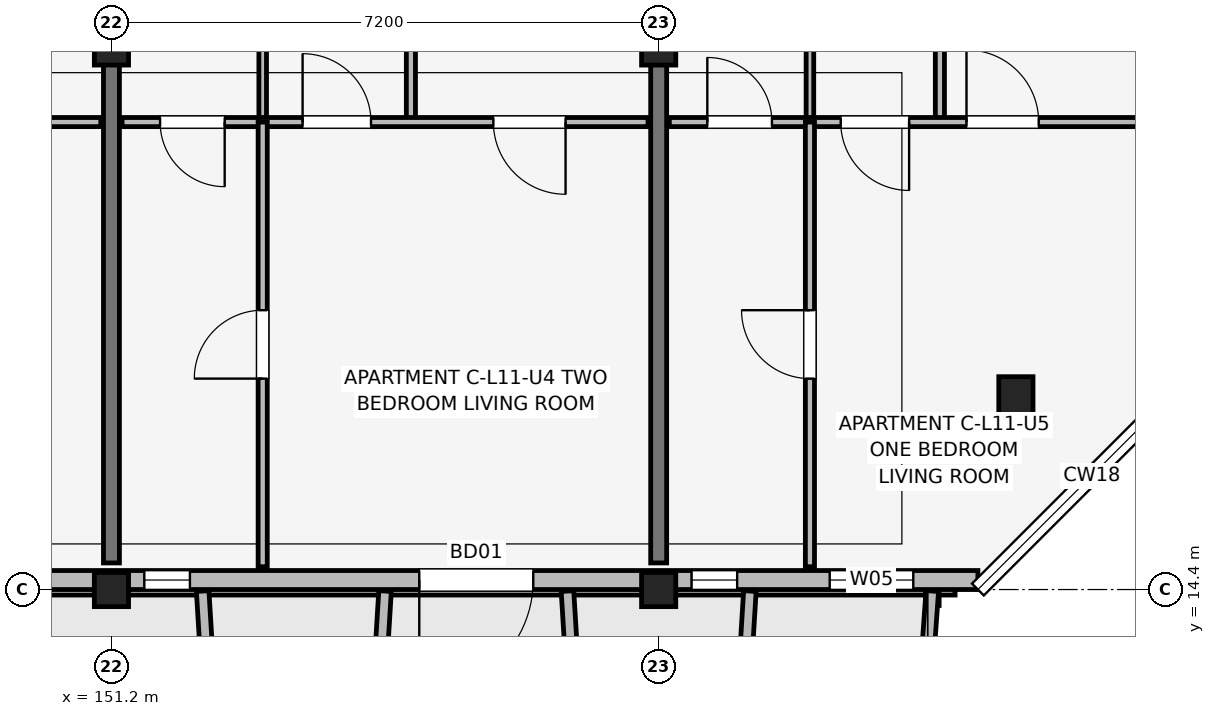
"""IFC4 building model, lengths in metres.
Left out: names, types, materials, properties, quantities, classifications, styles, units other than length and angle.
Written with IfcOpenShell. Run it as: python <this file> out.ifc"""

import sys

from ifc_helpers import new_model, si_unit, direction, frame, frame_2d, origin, origin_2d, place, context, subcontext, project, spatial, rectangle, extrude, element, fill, save


model = new_model("IFC4")
c1 = context("Model", 3, precision=1e-05, world=origin(), true_north=direction((0.0, 1.0)))
c2 = subcontext(c1, "Body", "Model", "MODEL_VIEW")
j1 = project(units=[si_unit("LENGTHUNIT", "METRE"), si_unit("PLANEANGLEUNIT", "RADIAN")], contexts=[c1])
p1 = place(None, origin())
s1 = spatial("IfcSite", under=j1, at=p1, CompositionType="ELEMENT")
p2 = place(p1, origin())
s2 = spatial("IfcBuilding", under=s1, at=p2, CompositionType="ELEMENT")
p3 = place(p2, frame((0.0, 0.0, 37.05)))
s3 = spatial("IfcBuildingStorey", under=s2, at=p3, CompositionType="ELEMENT", Elevation=37.05)
p4 = place(p3, frame((151.2, 14.4, 0.0), z_axis=(0.0, 0.0, 1.0), x_axis=(1.0, 0.0, 0.0)))
e1 = element("IfcColumn", 1, at=p4, inside=s3, PredefinedType="COLUMN", context=c2, shape_type="SweptSolid", body=[
    extrude(rectangle(XDim=0.45, YDim=0.45, at=origin_2d()), origin(), (0.0, 0.0, 1.0), 3.15),
])
p5 = place(p3, frame((151.2, 21.6, 0.0), z_axis=(0.0, 0.0, 1.0), x_axis=(1.0, 0.0, 0.0)))
e2 = element("IfcColumn", 2, at=p5, inside=s3, PredefinedType="COLUMN", context=c2, shape_type="SweptSolid", body=[
    extrude(rectangle(XDim=0.45, YDim=0.6, at=origin_2d()), origin(), (0.0, 0.0, 1.0), 3.15),
])
p6 = place(p3, frame((158.4, 14.4, 0.0), z_axis=(0.0, 0.0, 1.0), x_axis=(1.0, 0.0, 0.0)))
e3 = element("IfcColumn", 3, at=p6, inside=s3, PredefinedType="COLUMN", context=c2, shape_type="SweptSolid", body=[
    extrude(rectangle(XDim=0.45, YDim=0.45, at=origin_2d()), origin(), (0.0, 0.0, 1.0), 3.15),
])
for number, where, z_axis, x_axis in (
    (4, (158.4, 21.6, 0.0), (0.0, 0.0, 1.0), (1.0, 0.0, 0.0)),
    (5, (163.1, 16.9, 0.0), (0.0, 0.0, 1.0), (1.0, 0.0, 0.0)),
):
    element("IfcColumn", number, at=place(p3, frame(where, z_axis=z_axis, x_axis=x_axis)), inside=s3, PredefinedType="COLUMN", context=c2, shape_type="SweptSolid", body=[
        extrude(rectangle(XDim=0.45, YDim=0.6, at=origin_2d()), origin(), (0.0, 0.0, 1.0), 3.15),
    ])
for number, where, z_axis, x_axis in (
    (6, (151.2, 14.75, 0.0), (0.0, 0.0, 1.0), (0.0, 1.0, 0.0)),
    (7, (158.4, 14.75, 0.0), (0.0, 0.0, 1.0), (0.0, 1.0, 0.0)),
):
    element("IfcWall", number, at=place(p3, frame(where, z_axis=z_axis, x_axis=x_axis)), inside=s3, PredefinedType="SHEAR", context=c2, shape_type="SweptSolid", body=[
        extrude(rectangle(XDim=9.4, YDim=0.21, at=frame_2d((4.7, 0.0))), origin(), (0.0, 0.0, 1.0), 3.15),
    ])
p7 = place(p3, frame((132.6, 14.525, 0.0), z_axis=(0.0, 0.0, 1.0), x_axis=(1.0, 0.0, 0.0)))
e8 = element("IfcWall", 8, at=p7, inside=s3, PredefinedType="SOLIDWALL", context=c2, shape_type="SweptSolid", body=[
    extrude(rectangle(XDim=30.0, YDim=0.25, at=frame_2d((15.0, 0.0))), origin(), (0.0, 0.0, 1.0), 2.45),
])
p8 = place(p7, frame((9.825, 0.0, 0.0), z_axis=(0.0, 0.0, 1.0), x_axis=(-1.0, 0.0, 0.0)))
e9 = element("IfcOpeningElement", 9, at=p8, cuts=e8, PredefinedType="OPENING", context=c2, shape_type="SweptSolid", body=[
    extrude(rectangle(XDim=1.65, YDim=2.15, at=frame_2d((0.825, 1.075))), frame((0.0, 0.135, 0.0), z_axis=(0.0, -1.0, 0.0), x_axis=(1.0, 0.0, 0.0)), (0.0, 0.0, 1.0), 0.27),
])
p9 = place(p7, frame((24.15, 0.0, 0.0), z_axis=(0.0, 0.0, 1.0), x_axis=(-1.0, 0.0, 0.0)))
e10 = element("IfcOpeningElement", 10, at=p9, cuts=e8, PredefinedType="OPENING", context=c2, shape_type="SweptSolid", body=[
    extrude(rectangle(XDim=1.5, YDim=2.15, at=frame_2d((0.75, 1.075))), frame((0.0, 0.135, 0.0), z_axis=(0.0, -1.0, 0.0), x_axis=(1.0, 0.0, 0.0)), (0.0, 0.0, 1.0), 0.27),
])
p10 = place(p7, frame((0.77, 0.0, 0.7)))
e11 = element("IfcOpeningElement", 11, at=p10, cuts=e8, PredefinedType="OPENING", context=c2, shape_type="SweptSolid", body=[
    extrude(rectangle(XDim=1.46, YDim=1.55, at=frame_2d((0.73, 0.775))), frame((0.0, 0.135, 0.0), z_axis=(0.0, -1.0, 0.0), x_axis=(1.0, 0.0, 0.0)), (0.0, 0.0, 1.0), 0.27),
])
p11 = place(p7, frame((3.167, 0.0, 0.75)))
e12 = element("IfcOpeningElement", 12, at=p11, cuts=e8, PredefinedType="OPENING", context=c2, shape_type="SweptSolid", body=[
    extrude(rectangle(XDim=0.6, YDim=1.25, at=frame_2d((0.3, 0.625))), frame((0.0, 0.135, 0.0), z_axis=(0.0, -1.0, 0.0), x_axis=(1.0, 0.0, 0.0)), (0.0, 0.0, 1.0), 0.27),
])
p12 = place(p7, frame((4.633, 0.0, 0.75)))
e13 = element("IfcOpeningElement", 13, at=p12, cuts=e8, PredefinedType="OPENING", context=c2, shape_type="SweptSolid", body=[
    extrude(rectangle(XDim=0.6, YDim=1.25, at=frame_2d((0.3, 0.625))), frame((0.0, 0.135, 0.0), z_axis=(0.0, -1.0, 0.0), x_axis=(1.0, 0.0, 0.0)), (0.0, 0.0, 1.0), 0.27),
])
p13 = place(p7, frame((12.87, 0.0, 0.7)))
e14 = element("IfcOpeningElement", 14, at=p13, cuts=e8, PredefinedType="OPENING", context=c2, shape_type="SweptSolid", body=[
    extrude(rectangle(XDim=1.86, YDim=1.6, at=frame_2d((0.93, 0.8))), frame((0.0, 0.135, 0.0), z_axis=(0.0, -1.0, 0.0), x_axis=(1.0, 0.0, 0.0)), (0.0, 0.0, 1.0), 0.27),
])
p14 = place(p7, frame((16.165, 0.0, 0.75)))
e15 = element("IfcOpeningElement", 15, at=p14, cuts=e8, PredefinedType="OPENING", context=c2, shape_type="SweptSolid", body=[
    extrude(rectangle(XDim=0.72, YDim=1.35, at=frame_2d((0.36, 0.675))), frame((0.0, 0.135, 0.0), z_axis=(0.0, -1.0, 0.0), x_axis=(1.0, 0.0, 0.0)), (0.0, 0.0, 1.0), 0.27),
])
p15 = place(p7, frame((19.032, 0.0, 0.75)))
e16 = element("IfcOpeningElement", 16, at=p15, cuts=e8, PredefinedType="OPENING", context=c2, shape_type="SweptSolid", body=[
    extrude(rectangle(XDim=0.6, YDim=1.25, at=frame_2d((0.3, 0.625))), frame((0.0, 0.135, 0.0), z_axis=(0.0, -1.0, 0.0), x_axis=(1.0, 0.0, 0.0)), (0.0, 0.0, 1.0), 0.27),
])
p16 = place(p7, frame((26.232, 0.0, 0.75)))
e17 = element("IfcOpeningElement", 17, at=p16, cuts=e8, PredefinedType="OPENING", context=c2, shape_type="SweptSolid", body=[
    extrude(rectangle(XDim=0.6, YDim=1.25, at=frame_2d((0.3, 0.625))), frame((0.0, 0.135, 0.0), z_axis=(0.0, -1.0, 0.0), x_axis=(1.0, 0.0, 0.0)), (0.0, 0.0, 1.0), 0.27),
])
p17 = place(p7, frame((28.05, 0.0, 0.75)))
e18 = element("IfcOpeningElement", 18, at=p17, cuts=e8, PredefinedType="OPENING", context=c2, shape_type="SweptSolid", body=[
    extrude(rectangle(XDim=1.1, YDim=1.5, at=frame_2d((0.55, 0.75))), frame((0.0, 0.135, 0.0), z_axis=(0.0, -1.0, 0.0), x_axis=(1.0, 0.0, 0.0)), (0.0, 0.0, 1.0), 0.27),
])
for number, where, z_axis, x_axis in (
    (19, (152.4, 14.38, 0.0), (0.0, 0.0, 1.0), (0.061, -0.998, 0.0)),
    (20, (154.8, 14.38, 0.0), (0.0, 0.0, 1.0), (-0.061, -0.998, 0.0)),
    (21, (157.2, 14.38, 0.0), (0.0, 0.0, 1.0), (0.061, -0.998, 0.0)),
):
    element("IfcWall", number, at=place(p3, frame(where, z_axis=z_axis, x_axis=x_axis)), inside=s3, PredefinedType="ELEMENTEDWALL", context=c2, shape_type="SweptSolid", body=[
        extrude(rectangle(XDim=1.964, YDim=0.165, at=frame_2d((0.982, 0.0))), origin(), (0.0, 0.0, 1.0), 2.53),
    ])
p18 = place(p3, frame((159.6, 14.38, 0.0), z_axis=(0.0, 0.0, 1.0), x_axis=(-0.061170732449, -0.998127317276, 0.0)))
e22 = element("IfcWall", 22, at=p18, inside=s3, PredefinedType="ELEMENTEDWALL", context=c2, shape_type="SweptSolid", body=[
    extrude(rectangle(XDim=1.964, YDim=0.165, at=frame_2d((0.982, 0.0))), origin(), (0.0, 0.0, 1.0), 2.95),
])
p19 = place(p3, frame((162.0, 14.38, 0.0), z_axis=(0.0, 0.0, 1.0), x_axis=(-0.071194071069, -0.997462482625, 0.0)))
e23 = element("IfcWall", 23, at=p19, inside=s3, PredefinedType="ELEMENTEDWALL", context=c2, shape_type="SweptSolid", body=[
    extrude(rectangle(XDim=1.965, YDim=0.165, at=frame_2d((0.982, 0.0))), origin(), (0.0, 0.0, 1.0), 2.95),
])
p20 = place(p3, frame((144.14, 20.55, 0.0), z_axis=(0.0, 0.0, 1.0), x_axis=(1.0, 0.0, 0.0)))
e24 = element("IfcWall", 24, at=p20, inside=s3, PredefinedType="PARTITIONING", context=c2, shape_type="SweptSolid", body=[
    extrude(rectangle(XDim=6.92, YDim=0.12, at=frame_2d((3.46, 0.0))), origin(), (0.0, 0.0, 1.0), 2.38),
])
p21 = place(p20, frame((0.5, 0.0, 0.0)))
e25 = element("IfcOpeningElement", 25, at=p21, cuts=e24, PredefinedType="OPENING", context=c2, shape_type="SweptSolid", body=[
    extrude(rectangle(XDim=0.85, YDim=2.08, at=frame_2d((0.425, 1.04))), frame((0.0, 0.07, 0.0), z_axis=(0.0, -1.0, 0.0), x_axis=(1.0, 0.0, 0.0)), (0.0, 0.0, 1.0), 0.14),
])
p22 = place(p20, frame((3.425, 0.0, 0.0), z_axis=(0.0, 0.0, 1.0), x_axis=(-1.0, 0.0, 0.0)))
e26 = element("IfcOpeningElement", 26, at=p22, cuts=e24, PredefinedType="OPENING", context=c2, shape_type="SweptSolid", body=[
    extrude(rectangle(XDim=0.9, YDim=2.08, at=frame_2d((0.45, 1.04))), frame((0.0, 0.07, 0.0), z_axis=(0.0, -1.0, 0.0), x_axis=(1.0, 0.0, 0.0)), (0.0, 0.0, 1.0), 0.14),
])
p23 = place(p20, frame((5.035, 0.0, 0.0)))
e27 = element("IfcOpeningElement", 27, at=p23, cuts=e24, PredefinedType="OPENING", context=c2, shape_type="SweptSolid", body=[
    extrude(rectangle(XDim=0.95, YDim=2.08, at=frame_2d((0.475, 1.04))), frame((0.0, 0.07, 0.0), z_axis=(0.0, -1.0, 0.0), x_axis=(1.0, 0.0, 0.0)), (0.0, 0.0, 1.0), 0.14),
])
p24 = place(p3, frame((153.19, 20.55, 0.0), z_axis=(0.0, 0.0, 1.0), x_axis=(0.0, 1.0, 0.0)))
e28 = element("IfcWall", 28, at=p24, inside=s3, PredefinedType="PARTITIONING", context=c2, shape_type="SweptSolid", body=[
    extrude(rectangle(XDim=3.75, YDim=0.1, at=frame_2d((1.875, 0.0))), origin(), (0.0, 0.0, 1.0), 2.38),
])
p25 = place(p3, frame((155.14, 20.55, 0.0), z_axis=(0.0, 0.0, 1.0), x_axis=(0.0, 1.0, 0.0)))
e29 = element("IfcWall", 29, at=p25, inside=s3, PredefinedType="PARTITIONING", context=c2, shape_type="SweptSolid", body=[
    extrude(rectangle(XDim=3.75, YDim=0.12, at=frame_2d((1.875, 0.0))), origin(), (0.0, 0.0, 1.0), 2.38),
])
p26 = place(p3, frame((151.34, 20.55, 0.0), z_axis=(0.0, 0.0, 1.0), x_axis=(1.0, 0.0, 0.0)))
e30 = element("IfcWall", 30, at=p26, inside=s3, PredefinedType="PARTITIONING", context=c2, shape_type="SweptSolid", body=[
    extrude(rectangle(XDim=6.92, YDim=0.12, at=frame_2d((3.46, 0.0))), origin(), (0.0, 0.0, 1.0), 2.38),
])
p27 = place(p26, frame((1.35, 0.0, 0.0), z_axis=(0.0, 0.0, 1.0), x_axis=(-1.0, 0.0, 0.0)))
e31 = element("IfcOpeningElement", 31, at=p27, cuts=e30, PredefinedType="OPENING", context=c2, shape_type="SweptSolid", body=[
    extrude(rectangle(XDim=0.85, YDim=2.08, at=frame_2d((0.425, 1.04))), frame((0.0, 0.07, 0.0), z_axis=(0.0, -1.0, 0.0), x_axis=(1.0, 0.0, 0.0)), (0.0, 0.0, 1.0), 0.14),
])
p28 = place(p26, frame((2.375, 0.0, 0.0)))
e32 = element("IfcOpeningElement", 32, at=p28, cuts=e30, PredefinedType="OPENING", context=c2, shape_type="SweptSolid", body=[
    extrude(rectangle(XDim=0.9, YDim=2.08, at=frame_2d((0.45, 1.04))), frame((0.0, 0.07, 0.0), z_axis=(0.0, -1.0, 0.0), x_axis=(1.0, 0.0, 0.0)), (0.0, 0.0, 1.0), 0.14),
])
p29 = place(p26, frame((5.835, 0.0, 0.0), z_axis=(0.0, 0.0, 1.0), x_axis=(-1.0, 0.0, 0.0)))
e33 = element("IfcOpeningElement", 33, at=p29, cuts=e30, PredefinedType="OPENING", context=c2, shape_type="SweptSolid", body=[
    extrude(rectangle(XDim=0.95, YDim=2.08, at=frame_2d((0.475, 1.04))), frame((0.0, 0.07, 0.0), z_axis=(0.0, -1.0, 0.0), x_axis=(1.0, 0.0, 0.0)), (0.0, 0.0, 1.0), 0.14),
])
p30 = place(p3, frame((153.19, 14.7, 0.0), z_axis=(0.0, 0.0, 1.0), x_axis=(0.0, 1.0, 0.0)))
e34 = element("IfcWall", 34, at=p30, inside=s3, PredefinedType="PARTITIONING", context=c2, shape_type="SweptSolid", body=[
    extrude(rectangle(XDim=5.85, YDim=0.12, at=frame_2d((2.925, 0.0))), origin(), (0.0, 0.0, 1.0), 2.38),
])
p31 = place(p30, frame((2.475, 0.0, 0.0)))
e35 = element("IfcOpeningElement", 35, at=p31, cuts=e34, PredefinedType="OPENING", context=c2, shape_type="SweptSolid", body=[
    extrude(rectangle(XDim=0.9, YDim=2.08, at=frame_2d((0.45, 1.04))), frame((0.0, 0.07, 0.0), z_axis=(0.0, -1.0, 0.0), x_axis=(1.0, 0.0, 0.0)), (0.0, 0.0, 1.0), 0.14),
])
p32 = place(p3, frame((160.39, 20.55, 0.0), z_axis=(0.0, 0.0, 1.0), x_axis=(0.0, 1.0, 0.0)))
e36 = element("IfcWall", 36, at=p32, inside=s3, PredefinedType="PARTITIONING", context=c2, shape_type="SweptSolid", body=[
    extrude(rectangle(XDim=3.75, YDim=0.1, at=frame_2d((1.875, 0.0))), origin(), (0.0, 0.0, 1.0), 2.38),
])
p33 = place(p3, frame((162.1, 20.55, 0.0), z_axis=(0.0, 0.0, 1.0), x_axis=(0.0, 1.0, 0.0)))
e37 = element("IfcWall", 37, at=p33, inside=s3, PredefinedType="PARTITIONING", context=c2, shape_type="SweptSolid", body=[
    extrude(rectangle(XDim=3.75, YDim=0.12, at=frame_2d((1.875, 0.0))), origin(), (0.0, 0.0, 1.0), 2.38),
])
p34 = place(p3, frame((158.54, 20.55, 0.0), z_axis=(0.0, 0.0, 1.0), x_axis=(1.0, 0.0, 0.0)))
e38 = element("IfcWall", 38, at=p34, inside=s3, PredefinedType="PARTITIONING", context=c2, shape_type="SweptSolid", body=[
    extrude(rectangle(XDim=6.92, YDim=0.12, at=frame_2d((3.46, 0.0))), origin(), (0.0, 0.0, 1.0), 2.38),
])
p35 = place(p34, frame((0.5, 0.0, 0.0)))
e39 = element("IfcOpeningElement", 39, at=p35, cuts=e38, PredefinedType="OPENING", context=c2, shape_type="SweptSolid", body=[
    extrude(rectangle(XDim=0.85, YDim=2.08, at=frame_2d((0.425, 1.04))), frame((0.0, 0.07, 0.0), z_axis=(0.0, -1.0, 0.0), x_axis=(1.0, 0.0, 0.0)), (0.0, 0.0, 1.0), 0.14),
])
p36 = place(p34, frame((3.155, 0.0, 0.0), z_axis=(0.0, 0.0, 1.0), x_axis=(-1.0, 0.0, 0.0)))
e40 = element("IfcOpeningElement", 40, at=p36, cuts=e38, PredefinedType="OPENING", context=c2, shape_type="SweptSolid", body=[
    extrude(rectangle(XDim=0.9, YDim=2.08, at=frame_2d((0.45, 1.04))), frame((0.0, 0.07, 0.0), z_axis=(0.0, -1.0, 0.0), x_axis=(1.0, 0.0, 0.0)), (0.0, 0.0, 1.0), 0.14),
])
p37 = place(p34, frame((3.91, 0.0, 0.0)))
e41 = element("IfcOpeningElement", 41, at=p37, cuts=e38, PredefinedType="OPENING", context=c2, shape_type="SweptSolid", body=[
    extrude(rectangle(XDim=0.95, YDim=2.08, at=frame_2d((0.475, 1.04))), frame((0.0, 0.07, 0.0), z_axis=(0.0, -1.0, 0.0), x_axis=(1.0, 0.0, 0.0)), (0.0, 0.0, 1.0), 0.14),
])
p38 = place(p3, frame((160.39, 14.7, 0.0), z_axis=(0.0, 0.0, 1.0), x_axis=(0.0, 1.0, 0.0)))
e42 = element("IfcWall", 42, at=p38, inside=s3, PredefinedType="PARTITIONING", context=c2, shape_type="SweptSolid", body=[
    extrude(rectangle(XDim=5.85, YDim=0.12, at=frame_2d((2.925, 0.0))), origin(), (0.0, 0.0, 1.0), 2.38),
])
p39 = place(p38, frame((2.475, 0.0, 0.0)))
e43 = element("IfcOpeningElement", 43, at=p39, cuts=e42, PredefinedType="OPENING", context=c2, shape_type="SweptSolid", body=[
    extrude(rectangle(XDim=0.9, YDim=2.08, at=frame_2d((0.45, 1.04))), frame((0.0, 0.07, 0.0), z_axis=(0.0, -1.0, 0.0), x_axis=(1.0, 0.0, 0.0)), (0.0, 0.0, 1.0), 0.14),
])
p40 = place(p9, origin())
e44 = element("IfcDoor", 44, at=p40, inside=s3, OperationType="SINGLE_SWING_LEFT", PredefinedType="DOOR", context=c2, shape_type="SweptSolid", body=[
    extrude(rectangle(XDim=1.5, YDim=2.15, at=frame_2d((0.75, 1.075))), frame((0.0, 0.025, 0.0), z_axis=(0.0, -1.0, 0.0), x_axis=(1.0, 0.0, 0.0)), (0.0, 0.0, 1.0), 0.05),
])
fill(e10, e44)
p41 = place(p15, origin())
e45 = element("IfcWindow", 45, at=p41, inside=s3, PartitioningType="SINGLE_PANEL", PredefinedType="WINDOW", context=c2, shape_type="SweptSolid", body=[
    extrude(rectangle(XDim=0.6, YDim=1.25, at=frame_2d((0.3, 0.625))), frame((0.0, 0.03, 0.0), z_axis=(0.0, -1.0, 0.0), x_axis=(1.0, 0.0, 0.0)), (0.0, 0.0, 1.0), 0.06),
])
fill(e16, e45)
p42 = place(p16, origin())
e46 = element("IfcWindow", 46, at=p42, inside=s3, PartitioningType="SINGLE_PANEL", PredefinedType="WINDOW", context=c2, shape_type="SweptSolid", body=[
    extrude(rectangle(XDim=0.6, YDim=1.25, at=frame_2d((0.3, 0.625))), frame((0.0, 0.03, 0.0), z_axis=(0.0, -1.0, 0.0), x_axis=(1.0, 0.0, 0.0)), (0.0, 0.0, 1.0), 0.06),
])
fill(e17, e46)
p43 = place(p17, origin())
e47 = element("IfcWindow", 47, at=p43, inside=s3, PartitioningType="SINGLE_PANEL", PredefinedType="WINDOW", context=c2, shape_type="SweptSolid", body=[
    extrude(rectangle(XDim=1.1, YDim=1.5, at=frame_2d((0.55, 0.75))), frame((0.0, 0.03, 0.0), z_axis=(0.0, -1.0, 0.0), x_axis=(1.0, 0.0, 0.0)), (0.0, 0.0, 1.0), 0.06),
])
fill(e18, e47)
p44 = place(p27, origin())
e48 = element("IfcDoor", 48, at=p44, inside=s3, OperationType="SINGLE_SWING_RIGHT", PredefinedType="DOOR", context=c2, shape_type="SweptSolid", body=[
    extrude(rectangle(XDim=0.85, YDim=2.08, at=frame_2d((0.425, 1.04))), frame((0.0, 0.025, 0.0), z_axis=(0.0, -1.0, 0.0), x_axis=(1.0, 0.0, 0.0)), (0.0, 0.0, 1.0), 0.05),
])
fill(e31, e48)
p45 = place(p28, origin())
e49 = element("IfcDoor", 49, at=p45, inside=s3, OperationType="SINGLE_SWING_LEFT", PredefinedType="DOOR", context=c2, shape_type="SweptSolid", body=[
    extrude(rectangle(XDim=0.9, YDim=2.08, at=frame_2d((0.45, 1.04))), frame((0.0, 0.025, 0.0), z_axis=(0.0, -1.0, 0.0), x_axis=(1.0, 0.0, 0.0)), (0.0, 0.0, 1.0), 0.05),
])
fill(e32, e49)
p46 = place(p29, origin())
e50 = element("IfcDoor", 50, at=p46, inside=s3, OperationType="SINGLE_SWING_RIGHT", PredefinedType="DOOR", context=c2, shape_type="SweptSolid", body=[
    extrude(rectangle(XDim=0.95, YDim=2.08, at=frame_2d((0.475, 1.04))), frame((0.0, 0.025, 0.0), z_axis=(0.0, -1.0, 0.0), x_axis=(1.0, 0.0, 0.0)), (0.0, 0.0, 1.0), 0.05),
])
fill(e33, e50)
p47 = place(p31, origin())
e51 = element("IfcDoor", 51, at=p47, inside=s3, OperationType="SINGLE_SWING_LEFT", PredefinedType="DOOR", context=c2, shape_type="SweptSolid", body=[
    extrude(rectangle(XDim=0.9, YDim=2.08, at=frame_2d((0.45, 1.04))), frame((0.0, 0.025, 0.0), z_axis=(0.0, -1.0, 0.0), x_axis=(1.0, 0.0, 0.0)), (0.0, 0.0, 1.0), 0.05),
])
fill(e35, e51)
p48 = place(p35, origin())
e52 = element("IfcDoor", 52, at=p48, inside=s3, OperationType="SINGLE_SWING_LEFT", PredefinedType="DOOR", context=c2, shape_type="SweptSolid", body=[
    extrude(rectangle(XDim=0.85, YDim=2.08, at=frame_2d((0.425, 1.04))), frame((0.0, 0.025, 0.0), z_axis=(0.0, -1.0, 0.0), x_axis=(1.0, 0.0, 0.0)), (0.0, 0.0, 1.0), 0.05),
])
fill(e39, e52)
p49 = place(p36, origin())
e53 = element("IfcDoor", 53, at=p49, inside=s3, OperationType="SINGLE_SWING_RIGHT", PredefinedType="DOOR", context=c2, shape_type="SweptSolid", body=[
    extrude(rectangle(XDim=0.9, YDim=2.08, at=frame_2d((0.45, 1.04))), frame((0.0, 0.025, 0.0), z_axis=(0.0, -1.0, 0.0), x_axis=(1.0, 0.0, 0.0)), (0.0, 0.0, 1.0), 0.05),
])
fill(e40, e53)
p50 = place(p37, origin())
e54 = element("IfcDoor", 54, at=p50, inside=s3, OperationType="SINGLE_SWING_LEFT", PredefinedType="DOOR", context=c2, shape_type="SweptSolid", body=[
    extrude(rectangle(XDim=0.95, YDim=2.08, at=frame_2d((0.475, 1.04))), frame((0.0, 0.025, 0.0), z_axis=(0.0, -1.0, 0.0), x_axis=(1.0, 0.0, 0.0)), (0.0, 0.0, 1.0), 0.05),
])
fill(e41, e54)
p51 = place(p39, origin())
e55 = element("IfcDoor", 55, at=p51, inside=s3, OperationType="SINGLE_SWING_RIGHT", PredefinedType="DOOR", context=c2, shape_type="SweptSolid", body=[
    extrude(rectangle(XDim=0.9, YDim=2.08, at=frame_2d((0.45, 1.04))), frame((0.0, 0.025, 0.0), z_axis=(0.0, -1.0, 0.0), x_axis=(1.0, 0.0, 0.0)), (0.0, 0.0, 1.0), 0.05),
])
fill(e43, e55)
save(model, sys.argv[1])
